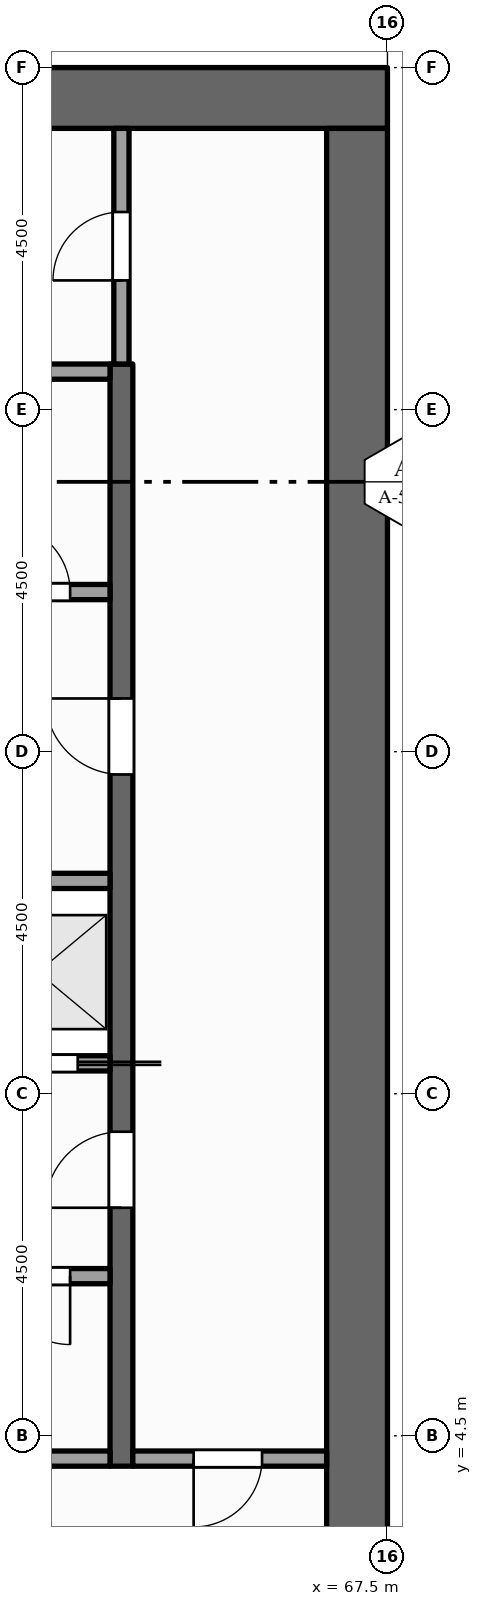
"""IFC4 building model, lengths in metres.
Left out: names, types, materials, properties, quantities, classifications, styles, units other than length and angle.
Written with IfcOpenShell. Run it as: python <this file> out.ifc"""

import sys

from ifc_helpers import new_model, si_unit, direction, frame, frame_2d, origin, place, context, subcontext, project, spatial, rectangle, extrude, element, fill, save


model = new_model("IFC4")
c1 = context("Model", 3, precision=1e-05, world=origin(), true_north=direction((0.0, 1.0)))
c2 = subcontext(c1, "Body", "Model", "MODEL_VIEW")
j1 = project(units=[si_unit("LENGTHUNIT", "METRE"), si_unit("PLANEANGLEUNIT", "RADIAN")], contexts=[c1])
p1 = place(None, origin())
s1 = spatial("IfcSite", under=j1, at=p1, CompositionType="ELEMENT")
p2 = place(p1, origin())
s2 = spatial("IfcBuilding", under=s1, at=p2, CompositionType="ELEMENT")
p3 = place(p2, frame((0.0, 0.0, 243.0)))
s3 = spatial("IfcBuildingStorey", under=s2, at=p3, CompositionType="ELEMENT", Elevation=243.0)
p4 = place(p3, frame((54.0, 22.1, -0.15), z_axis=(0.0, 0.0, 1.0), x_axis=(1.0, 0.0, 0.0)))
e1 = element("IfcWall", 1, at=p4, inside=s3, PredefinedType="SHEAR", context=c2, shape_type="SweptSolid", body=[
    extrude(rectangle(XDim=13.5, YDim=0.8, at=frame_2d((6.75, 0.0))), origin(), (0.0, 0.0, 1.0), 6.0),
])
p5 = place(p3, frame((67.1, 0.8, -0.15), z_axis=(0.0, 0.0, 1.0), x_axis=(0.0, 1.0, 0.0)))
e2 = element("IfcWall", 2, at=p5, inside=s3, PredefinedType="SHEAR", context=c2, shape_type="SweptSolid", body=[
    extrude(rectangle(XDim=20.9, YDim=0.8, at=frame_2d((10.45, 0.0))), origin(), (0.0, 0.0, 1.0), 6.0),
])
p6 = place(p3, frame((64.0, 4.1, 0.0), z_axis=(0.0, 0.0, 1.0), x_axis=(0.0, 1.0, 0.0)))
e3 = element("IfcWall", 3, at=p6, inside=s3, PredefinedType="SHEAR", context=c2, shape_type="SweptSolid", body=[
    extrude(rectangle(XDim=14.5, YDim=0.3, at=frame_2d((7.25, 0.0))), origin(), (0.0, 0.0, 1.0), 5.85),
])
p7 = place(p6, frame((3.4, 0.0, 0.0)))
e4 = element("IfcOpeningElement", 4, at=p7, cuts=e3, PredefinedType="OPENING", context=c2, shape_type="SweptSolid", body=[
    extrude(rectangle(XDim=1.0, YDim=2.1, at=frame_2d((0.5, 1.05))), frame((0.0, 0.16, 0.0), z_axis=(0.0, -1.0, 0.0), x_axis=(1.0, 0.0, 0.0)), (0.0, 0.0, 1.0), 0.32),
])
p8 = place(p6, frame((9.1, 0.0, 0.0)))
e5 = element("IfcOpeningElement", 5, at=p8, cuts=e3, PredefinedType="OPENING", context=c2, shape_type="SweptSolid", body=[
    extrude(rectangle(XDim=1.0, YDim=2.1, at=frame_2d((0.5, 1.05))), frame((0.0, 0.16, 0.0), z_axis=(0.0, -1.0, 0.0), x_axis=(1.0, 0.0, 0.0)), (0.0, 0.0, 1.0), 0.32),
])
p9 = place(p3, frame((64.0, 18.6, 0.0), z_axis=(0.0, 0.0, 1.0), x_axis=(0.0, 1.0, 0.0)))
e6 = element("IfcWall", 6, at=p9, inside=s3, PredefinedType="PARTITIONING", context=c2, shape_type="SweptSolid", body=[
    extrude(rectangle(XDim=3.1, YDim=0.2, at=frame_2d((1.55, 0.0))), origin(), (0.0, 0.0, 1.0), 5.85),
])
p10 = place(p9, frame((1.1, 0.0, 0.0)))
e7 = element("IfcOpeningElement", 7, at=p10, cuts=e6, PredefinedType="OPENING", context=c2, shape_type="SweptSolid", body=[
    extrude(rectangle(XDim=0.9, YDim=2.1, at=frame_2d((0.45, 1.05))), frame((0.0, 0.11, 0.0), z_axis=(0.0, -1.0, 0.0), x_axis=(1.0, 0.0, 0.0)), (0.0, 0.0, 1.0), 0.22),
])
p11 = place(p3, frame((61.9, 4.2, 0.0), z_axis=(0.0, 0.0, 1.0), x_axis=(1.0, 0.0, 0.0)))
e8 = element("IfcWall", 8, at=p11, inside=s3, PredefinedType="PARTITIONING", context=c2, shape_type="SweptSolid", body=[
    extrude(rectangle(XDim=1.95, YDim=0.2, at=frame_2d((0.975, 0.0))), origin(), (0.0, 0.0, 1.0), 5.85),
])
p12 = place(p3, frame((64.15, 4.2, 0.0), z_axis=(0.0, 0.0, 1.0), x_axis=(1.0, 0.0, 0.0)))
e9 = element("IfcWall", 9, at=p12, inside=s3, PredefinedType="PARTITIONING", context=c2, shape_type="SweptSolid", body=[
    extrude(rectangle(XDim=2.55, YDim=0.2, at=frame_2d((1.275, 0.0))), origin(), (0.0, 0.0, 1.0), 5.85),
])
p13 = place(p12, frame((0.8, 0.0, 0.0)))
e10 = element("IfcOpeningElement", 10, at=p13, cuts=e9, PredefinedType="OPENING", context=c2, shape_type="SweptSolid", body=[
    extrude(rectangle(XDim=0.9, YDim=2.1, at=frame_2d((0.45, 1.05))), frame((0.0, 0.11, 0.0), z_axis=(0.0, -1.0, 0.0), x_axis=(1.0, 0.0, 0.0)), (0.0, 0.0, 1.0), 0.22),
])
p14 = place(p3, frame((61.9, 6.6, 0.0), z_axis=(0.0, 0.0, 1.0), x_axis=(1.0, 0.0, 0.0)))
e11 = element("IfcWall", 11, at=p14, inside=s3, PredefinedType="PARTITIONING", context=c2, shape_type="SweptSolid", body=[
    extrude(rectangle(XDim=1.95, YDim=0.2, at=frame_2d((0.975, 0.0))), origin(), (0.0, 0.0, 1.0), 5.85),
])
p15 = place(p14, frame((0.525, 0.0, 0.0)))
e12 = element("IfcOpeningElement", 12, at=p15, cuts=e11, PredefinedType="OPENING", context=c2, shape_type="SweptSolid", body=[
    extrude(rectangle(XDim=0.9, YDim=2.1, at=frame_2d((0.45, 1.05))), frame((0.0, 0.11, 0.0), z_axis=(0.0, -1.0, 0.0), x_axis=(1.0, 0.0, 0.0)), (0.0, 0.0, 1.0), 0.22),
])
p16 = place(p3, frame((61.9, 9.4, 0.0), z_axis=(0.0, 0.0, 1.0), x_axis=(1.0, 0.0, 0.0)))
e13 = element("IfcWall", 13, at=p16, inside=s3, PredefinedType="SOLIDWALL", context=c2, shape_type="SweptSolid", body=[
    extrude(rectangle(XDim=1.95, YDim=0.2, at=frame_2d((0.975, 0.0))), origin(), (0.0, 0.0, 1.0), 5.85),
])
p17 = place(p16, frame((0.425, 0.0, 0.012)))
e14 = element("IfcOpeningElement", 14, at=p17, cuts=e13, PredefinedType="OPENING", context=c2, shape_type="SweptSolid", body=[
    extrude(rectangle(XDim=1.1, YDim=2.1, at=frame_2d((0.55, 1.05))), frame((0.0, 0.11, 0.0), z_axis=(0.0, -1.0, 0.0), x_axis=(1.0, 0.0, 0.0)), (0.0, 0.0, 1.0), 0.22),
])
p18 = place(p3, frame((61.9, 11.8, 0.0), z_axis=(0.0, 0.0, 1.0), x_axis=(1.0, 0.0, 0.0)))
e15 = element("IfcWall", 15, at=p18, inside=s3, PredefinedType="SOLIDWALL", context=c2, shape_type="SweptSolid", body=[
    extrude(rectangle(XDim=1.95, YDim=0.2, at=frame_2d((0.975, 0.0))), origin(), (0.0, 0.0, 1.0), 5.85),
])
p19 = place(p3, frame((61.9, 15.6, 0.0), z_axis=(0.0, 0.0, 1.0), x_axis=(1.0, 0.0, 0.0)))
e16 = element("IfcWall", 16, at=p19, inside=s3, PredefinedType="PARTITIONING", context=c2, shape_type="SweptSolid", body=[
    extrude(rectangle(XDim=1.95, YDim=0.2, at=frame_2d((0.975, 0.0))), origin(), (0.0, 0.0, 1.0), 5.85),
])
p20 = place(p19, frame((0.525, 0.0, 0.0)))
e17 = element("IfcOpeningElement", 17, at=p20, cuts=e16, PredefinedType="OPENING", context=c2, shape_type="SweptSolid", body=[
    extrude(rectangle(XDim=0.9, YDim=2.1, at=frame_2d((0.45, 1.05))), frame((0.0, 0.11, 0.0), z_axis=(0.0, -1.0, 0.0), x_axis=(1.0, 0.0, 0.0)), (0.0, 0.0, 1.0), 0.22),
])
p21 = place(p3, frame((61.9, 18.5, 0.0), z_axis=(0.0, 0.0, 1.0), x_axis=(1.0, 0.0, 0.0)))
e18 = element("IfcWall", 18, at=p21, inside=s3, PredefinedType="PARTITIONING", context=c2, shape_type="SweptSolid", body=[
    extrude(rectangle(XDim=1.95, YDim=0.2, at=frame_2d((0.975, 0.0))), origin(), (0.0, 0.0, 1.0), 5.85),
])
p22 = place(p17, origin())
e19 = element("IfcDoor", 19, at=p22, inside=s3, OperationType="SLIDING_TO_RIGHT", PredefinedType="DOOR", context=c2, shape_type="SweptSolid", body=[
    extrude(rectangle(XDim=1.1, YDim=2.1, at=frame_2d((0.55, 1.05))), frame((0.0, 0.025, 0.0), z_axis=(0.0, -1.0, 0.0), x_axis=(1.0, 0.0, 0.0)), (0.0, 0.0, 1.0), 0.05),
])
fill(e14, e19)
p23 = place(p7, origin())
e20 = element("IfcDoor", 20, at=p23, inside=s3, OperationType="SINGLE_SWING_LEFT", PredefinedType="DOOR", context=c2, shape_type="SweptSolid", body=[
    extrude(rectangle(XDim=1.0, YDim=2.1, at=frame_2d((0.5, 1.05))), frame((0.0, 0.025, 0.0), z_axis=(0.0, -1.0, 0.0), x_axis=(1.0, 0.0, 0.0)), (0.0, 0.0, 1.0), 0.05),
])
fill(e4, e20)
p24 = place(p8, origin())
e21 = element("IfcDoor", 21, at=p24, inside=s3, OperationType="SINGLE_SWING_RIGHT", PredefinedType="DOOR", context=c2, shape_type="SweptSolid", body=[
    extrude(rectangle(XDim=1.0, YDim=2.1, at=frame_2d((0.5, 1.05))), frame((0.0, 0.025, 0.0), z_axis=(0.0, -1.0, 0.0), x_axis=(1.0, 0.0, 0.0)), (0.0, 0.0, 1.0), 0.05),
])
fill(e5, e21)
p25 = place(p13, origin())
e22 = element("IfcDoor", 22, at=p25, inside=s3, OperationType="SINGLE_SWING_LEFT", PredefinedType="DOOR", context=c2, shape_type="SweptSolid", body=[
    extrude(rectangle(XDim=0.9, YDim=2.1, at=frame_2d((0.45, 1.05))), frame((0.0, 0.025, 0.0), z_axis=(0.0, -1.0, 0.0), x_axis=(1.0, 0.0, 0.0)), (0.0, 0.0, 1.0), 0.05),
])
fill(e10, e22)
p26 = place(p10, origin())
e23 = element("IfcDoor", 23, at=p26, inside=s3, OperationType="SINGLE_SWING_LEFT", PredefinedType="DOOR", context=c2, shape_type="SweptSolid", body=[
    extrude(rectangle(XDim=0.9, YDim=2.1, at=frame_2d((0.45, 1.05))), frame((0.0, 0.025, 0.0), z_axis=(0.0, -1.0, 0.0), x_axis=(1.0, 0.0, 0.0)), (0.0, 0.0, 1.0), 0.05),
])
fill(e7, e23)
p27 = place(p15, origin())
e24 = element("IfcDoor", 24, at=p27, inside=s3, OperationType="SINGLE_SWING_RIGHT", PredefinedType="DOOR", context=c2, shape_type="SweptSolid", body=[
    extrude(rectangle(XDim=0.9, YDim=2.1, at=frame_2d((0.45, 1.05))), frame((0.0, 0.025, 0.0), z_axis=(0.0, -1.0, 0.0), x_axis=(1.0, 0.0, 0.0)), (0.0, 0.0, 1.0), 0.05),
])
fill(e12, e24)
p28 = place(p20, origin())
e25 = element("IfcDoor", 25, at=p28, inside=s3, OperationType="SINGLE_SWING_LEFT", PredefinedType="DOOR", context=c2, shape_type="SweptSolid", body=[
    extrude(rectangle(XDim=0.9, YDim=2.1, at=frame_2d((0.45, 1.05))), frame((0.0, 0.025, 0.0), z_axis=(0.0, -1.0, 0.0), x_axis=(1.0, 0.0, 0.0)), (0.0, 0.0, 1.0), 0.05),
])
fill(e17, e25)
save(model, sys.argv[1])
